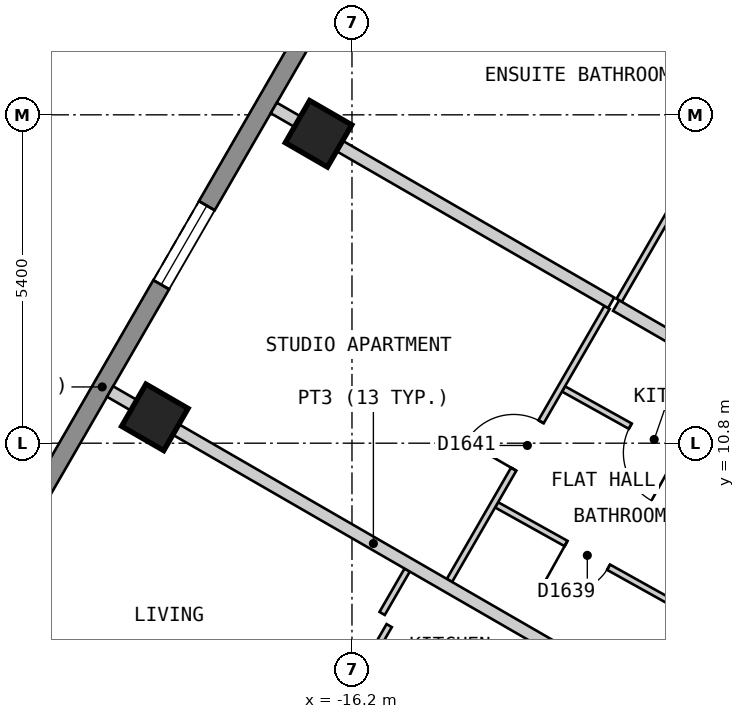
"""IFC4 building model, lengths in metres.
Left out: names, types, materials, properties, quantities, classifications, styles, units other than length and angle.
Written with IfcOpenShell. Run it as: python <this file> out.ifc"""

import sys

from ifc_helpers import new_model, si_unit, direction, frame, frame_2d, origin, origin_2d, place, context, subcontext, project, spatial, polyline, rectangle, outline, extrude, element, fill, save


model = new_model("IFC4")
c1 = context("Model", 3, precision=1e-05, world=origin(), true_north=direction((0.0, 1.0)))
c2 = subcontext(c1, "Body", "Model", "MODEL_VIEW")
j1 = project(units=[si_unit("LENGTHUNIT", "METRE"), si_unit("PLANEANGLEUNIT", "RADIAN")], contexts=[c1])
p1 = place(None, origin())
s1 = spatial("IfcSite", under=j1, at=p1, CompositionType="ELEMENT")
p2 = place(p1, origin())
s2 = spatial("IfcBuilding", under=s1, at=p2, CompositionType="ELEMENT")
p3 = place(p2, frame((0.0, 0.0, 163.2)))
s3 = spatial("IfcBuildingStorey", under=s2, at=p3, CompositionType="ELEMENT", Elevation=163.2)
for number, where, z_axis, x_axis in (
    (1, (-16.75, 15.888, 0.0), (0.0, 0.0, 1.0), (-0.5, -0.866, 0.0)),
    (2, (-19.442, 11.225, 0.0), (0.0, 0.0, 1.0), (-0.5, -0.866, 0.0)),
):
    element("IfcColumn", number, at=place(p3, frame(where, z_axis=z_axis, x_axis=x_axis)), inside=s3, PredefinedType="COLUMN", context=c2, shape_type="SweptSolid", body=[
        extrude(rectangle(XDim=0.8, YDim=0.8, at=origin_2d()), origin(), (0.0, 0.0, 1.0), 3.0),
    ])
p4 = place(p3, frame((-14.592, 21.625, 0.0), z_axis=(0.0, 0.0, 1.0), x_axis=(-0.500010537973, -0.866019319597, 0.0)))
e3 = element("IfcWall", 3, at=p4, inside=s3, PredefinedType="SOLIDWALL", context=c2, shape_type="SweptSolid", body=[
    extrude(outline(polyline([(0.0, -0.15), (22.863, -0.15), (22.783, 0.15), (0.08, 0.15), (0.0, -0.15)])), origin(), (0.0, 0.0, 1.0), 2.7),
])
p5 = place(p4, frame((2.606, 0.0, 0.15)))
e4 = element("IfcOpeningElement", 4, at=p5, cuts=e3, PredefinedType="OPENING", context=c2, shape_type="SweptSolid", body=[
    extrude(rectangle(XDim=1.5, YDim=2.1, at=frame_2d((0.75, 1.05))), frame((0.0, 0.16, 0.0), z_axis=(0.0, -1.0, 0.0), x_axis=(1.0, 0.0, 0.0)), (0.0, 0.0, 1.0), 0.32),
])
p6 = place(p4, frame((7.99, 0.0, 0.15)))
e5 = element("IfcOpeningElement", 5, at=p6, cuts=e3, PredefinedType="OPENING", context=c2, shape_type="SweptSolid", body=[
    extrude(rectangle(XDim=1.5, YDim=2.1, at=frame_2d((0.75, 1.05))), frame((0.0, 0.16, 0.0), z_axis=(0.0, -1.0, 0.0), x_axis=(1.0, 0.0, 0.0)), (0.0, 0.0, 1.0), 0.32),
])
p7 = place(p4, frame((13.373, 0.0, 0.15)))
e6 = element("IfcOpeningElement", 6, at=p7, cuts=e3, PredefinedType="OPENING", context=c2, shape_type="SweptSolid", body=[
    extrude(rectangle(XDim=1.5, YDim=2.1, at=frame_2d((0.75, 1.05))), frame((0.0, 0.16, 0.0), z_axis=(0.0, -1.0, 0.0), x_axis=(1.0, 0.0, 0.0)), (0.0, 0.0, 1.0), 0.32),
])
p8 = place(p4, frame((18.758, 0.0, 0.15)))
e7 = element("IfcOpeningElement", 7, at=p8, cuts=e3, PredefinedType="OPENING", context=c2, shape_type="SweptSolid", body=[
    extrude(rectangle(XDim=1.5, YDim=2.1, at=frame_2d((0.75, 1.05))), frame((0.0, 0.16, 0.0), z_axis=(0.0, -1.0, 0.0), x_axis=(1.0, 0.0, 0.0)), (0.0, 0.0, 1.0), 0.32),
])
p9 = place(p3, frame((-15.53, -0.501, 0.0), z_axis=(0.0, 0.0, 1.0), x_axis=(0.499952498232, 0.866052827206, 0.0)))
e8 = element("IfcWall", 8, at=p9, inside=s3, PredefinedType="PARTITIONING", context=c2, shape_type="SweptSolid", body=[
    extrude(rectangle(XDim=9.585, YDim=0.2, at=frame_2d((4.792, 0.0))), origin(), (0.0, 0.0, 1.0), 2.7),
])
p10 = place(p9, frame((5.031, 0.0, 0.0)))
e9 = element("IfcOpeningElement", 9, at=p10, cuts=e8, PredefinedType="OPENING", context=c2, shape_type="SweptSolid", body=[
    extrude(rectangle(XDim=1.0, YDim=2.1, at=frame_2d((0.5, 1.05))), frame((0.0, 0.11, 0.0), z_axis=(0.0, -1.0, 0.0), x_axis=(1.0, 0.0, 0.0)), (0.0, 0.0, 1.0), 0.22),
])
p11 = place(p3, frame((-12.721, 11.692, 0.0), z_axis=(0.0, 0.0, 1.0), x_axis=(0.873557394398, -0.486721150859, 0.0)))
e10 = element("IfcWall", 10, at=p11, inside=s3, PredefinedType="PARTITIONING", context=c2, shape_type="SweptSolid", body=[
    extrude(rectangle(XDim=3.363, YDim=0.1, at=frame_2d((1.682, 0.0))), origin(), (0.0, 0.0, 1.0), 2.7),
])
p12 = place(p11, frame((1.257, 0.0, 0.0)))
e11 = element("IfcOpeningElement", 11, at=p12, cuts=e10, PredefinedType="OPENING", context=c2, shape_type="SweptSolid", body=[
    extrude(rectangle(XDim=0.9, YDim=2.1, at=frame_2d((0.45, 1.05))), frame((0.0, 0.06, 0.0), z_axis=(0.0, -1.0, 0.0), x_axis=(1.0, 0.0, 0.0)), (0.0, 0.0, 1.0), 0.12),
])
p13 = place(p3, frame((-13.821, 9.786, 0.0), z_axis=(0.0, 0.0, 1.0), x_axis=(0.873644620966, -0.486564565353, 0.0)))
e12 = element("IfcWall", 12, at=p13, inside=s3, PredefinedType="PARTITIONING", context=c2, shape_type="SweptSolid", body=[
    extrude(rectangle(XDim=3.463, YDim=0.1, at=frame_2d((1.731, 0.0))), origin(), (0.0, 0.0, 1.0), 2.7),
])
p14 = place(p13, frame((1.307, 0.0, 0.0)))
e13 = element("IfcOpeningElement", 13, at=p14, cuts=e12, PredefinedType="OPENING", context=c2, shape_type="SweptSolid", body=[
    extrude(rectangle(XDim=0.8, YDim=2.1, at=frame_2d((0.4, 1.05))), frame((0.0, 0.06, 0.0), z_axis=(0.0, -1.0, 0.0), x_axis=(1.0, 0.0, 0.0)), (0.0, 0.0, 1.0), 0.12),
])
p15 = place(p3, frame((-11.806, 13.149, 0.0), z_axis=(0.0, 0.0, 1.0), x_axis=(0.499932199895, 0.866064544655, 0.0)))
e14 = element("IfcWall", 14, at=p15, inside=s3, PredefinedType="PARTITIONING", context=c2, shape_type="SweptSolid", body=[
    extrude(rectangle(XDim=8.833, YDim=0.1, at=frame_2d((4.417, 0.0))), origin(), (0.0, 0.0, 1.0), 2.7),
])
p16 = place(p15, frame((6.413, 0.0, 0.0)))
e15 = element("IfcOpeningElement", 15, at=p16, cuts=e14, PredefinedType="OPENING", context=c2, shape_type="SweptSolid", body=[
    extrude(rectangle(XDim=0.9, YDim=2.1, at=frame_2d((0.45, 1.05))), frame((0.0, 0.06, 0.0), z_axis=(0.0, -1.0, 0.0), x_axis=(1.0, 0.0, 0.0)), (0.0, 0.0, 1.0), 0.12),
])
p17 = place(p15, frame((2.004, 0.0, 0.0)))
e16 = element("IfcOpeningElement", 16, at=p17, cuts=e14, PredefinedType="OPENING", context=c2, shape_type="SweptSolid", body=[
    extrude(rectangle(XDim=0.8, YDim=2.1, at=frame_2d((0.4, 1.05))), frame((0.0, 0.06, 0.0), z_axis=(0.0, -1.0, 0.0), x_axis=(1.0, 0.0, 0.0)), (0.0, 0.0, 1.0), 0.12),
])
p18 = place(p3, frame((-14.597, 8.543, 0.0), z_axis=(0.0, 0.0, 1.0), x_axis=(0.499962957901, 0.866046788994, 0.0)))
e17 = element("IfcWall", 17, at=p18, inside=s3, PredefinedType="PARTITIONING", context=c2, shape_type="SweptSolid", body=[
    extrude(rectangle(XDim=5.185, YDim=0.1, at=frame_2d((2.592, 0.0))), origin(), (0.0, 0.0, 1.0), 2.7),
])
p19 = place(p18, frame((2.113, 0.0, 0.0)))
e18 = element("IfcOpeningElement", 18, at=p19, cuts=e17, PredefinedType="OPENING", context=c2, shape_type="SweptSolid", body=[
    extrude(rectangle(XDim=0.9, YDim=2.1, at=frame_2d((0.45, 1.05))), frame((0.0, 0.06, 0.0), z_axis=(0.0, -1.0, 0.0), x_axis=(1.0, 0.0, 0.0)), (0.0, 0.0, 1.0), 0.12),
])
p20 = place(p3, frame((-15.704, 8.0, 0.0), z_axis=(0.0, 0.0, 1.0), x_axis=(0.499833531678, 0.866121492985, 0.0)))
e19 = element("IfcWall", 19, at=p20, inside=s3, PredefinedType="PARTITIONING", context=c2, shape_type="SweptSolid", body=[
    extrude(rectangle(XDim=0.824, YDim=0.1, at=frame_2d((0.412, 0.0))), origin(), (0.0, 0.0, 1.0), 2.7),
])
p21 = place(p3, frame((-20.178, 11.65, 0.0), z_axis=(0.0, 0.0, 1.0), x_axis=(0.866016855193, -0.500014806302, 0.0)))
e20 = element("IfcWall", 20, at=p21, inside=s3, PredefinedType="PARTITIONING", context=c2, shape_type="SweptSolid", body=[
    extrude(rectangle(XDim=10.0, YDim=0.2, at=frame_2d((5.0, 0.0))), origin(), (0.0, 0.0, 1.0), 2.7),
])
p22 = place(p3, frame((-17.486, 16.313, 0.0), z_axis=(0.0, 0.0, 1.0), x_axis=(0.866002210665, -0.500040169509, 0.0)))
e21 = element("IfcWall", 21, at=p22, inside=s3, PredefinedType="PARTITIONING", context=c2, shape_type="SweptSolid", body=[
    extrude(rectangle(XDim=6.408, YDim=0.2, at=frame_2d((3.204, 0.0))), origin(), (0.0, 0.0, 1.0), 2.7),
])
p23 = place(p3, frame((-11.856, 13.063, 0.0), z_axis=(0.0, 0.0, 1.0), x_axis=(0.865966208357, -0.500102515474, 0.0)))
e22 = element("IfcWall", 22, at=p23, inside=s3, PredefinedType="PARTITIONING", context=c2, shape_type="SweptSolid", body=[
    extrude(rectangle(XDim=3.299, YDim=0.2, at=frame_2d((1.649, 0.0))), origin(), (0.0, 0.0, 1.0), 2.7),
])
p24 = place(p3, frame((-17.761, 4.037, 0.0), z_axis=(0.0, 0.0, 1.0), x_axis=(0.50009692756, 0.865969435399, 0.0)))
e23 = element("IfcWall", 23, at=p24, inside=s3, PredefinedType="PARTITIONING", context=c2, shape_type="SweptSolid", body=[
    extrude(rectangle(XDim=4.345, YDim=0.1, at=frame_2d((2.173, 0.0))), origin(), (0.0, 0.0, 1.0), 2.7),
])
p25 = place(p24, frame((2.22, 0.0, 0.0)))
e24 = element("IfcOpeningElement", 24, at=p25, cuts=e23, PredefinedType="OPENING", context=c2, shape_type="SweptSolid", body=[
    extrude(rectangle(XDim=0.9, YDim=2.1, at=frame_2d((0.45, 1.05))), frame((0.0, 0.06, 0.0), z_axis=(0.0, -1.0, 0.0), x_axis=(1.0, 0.0, 0.0)), (0.0, 0.0, 1.0), 0.12),
])
p26 = place(p6, origin())
e25 = element("IfcWindow", 25, at=p26, inside=s3, PartitioningType="SINGLE_PANEL", PredefinedType="WINDOW", context=c2, shape_type="SweptSolid", body=[
    extrude(rectangle(XDim=1.5, YDim=2.1, at=frame_2d((0.75, 1.05))), frame((0.0, 0.03, 0.0), z_axis=(0.0, -1.0, 0.0), x_axis=(1.0, 0.0, 0.0)), (0.0, 0.0, 1.0), 0.06),
])
fill(e5, e25)
p27 = place(p14, origin())
e26 = element("IfcDoor", 26, at=p27, inside=s3, OperationType="SINGLE_SWING_LEFT", PredefinedType="DOOR", context=c2, shape_type="SweptSolid", body=[
    extrude(rectangle(XDim=0.8, YDim=2.1, at=frame_2d((0.4, 1.05))), frame((0.0, 0.025, 0.0), z_axis=(0.0, -1.0, 0.0), x_axis=(1.0, 0.0, 0.0)), (0.0, 0.0, 1.0), 0.05),
])
fill(e13, e26)
p28 = place(p12, origin())
e27 = element("IfcDoor", 27, at=p28, inside=s3, OperationType="SINGLE_SWING_RIGHT", PredefinedType="DOOR", context=c2, shape_type="SweptSolid", body=[
    extrude(rectangle(XDim=0.9, YDim=2.1, at=frame_2d((0.45, 1.05))), frame((0.0, 0.025, 0.0), z_axis=(0.0, -1.0, 0.0), x_axis=(1.0, 0.0, 0.0)), (0.0, 0.0, 1.0), 0.05),
])
fill(e11, e27)
p29 = place(p19, origin())
e28 = element("IfcDoor", 28, at=p29, inside=s3, OperationType="SINGLE_SWING_LEFT", PredefinedType="DOOR", context=c2, shape_type="SweptSolid", body=[
    extrude(rectangle(XDim=0.9, YDim=2.1, at=frame_2d((0.45, 1.05))), frame((0.0, 0.025, 0.0), z_axis=(0.0, -1.0, 0.0), x_axis=(1.0, 0.0, 0.0)), (0.0, 0.0, 1.0), 0.05),
])
fill(e18, e28)
save(model, sys.argv[1])
